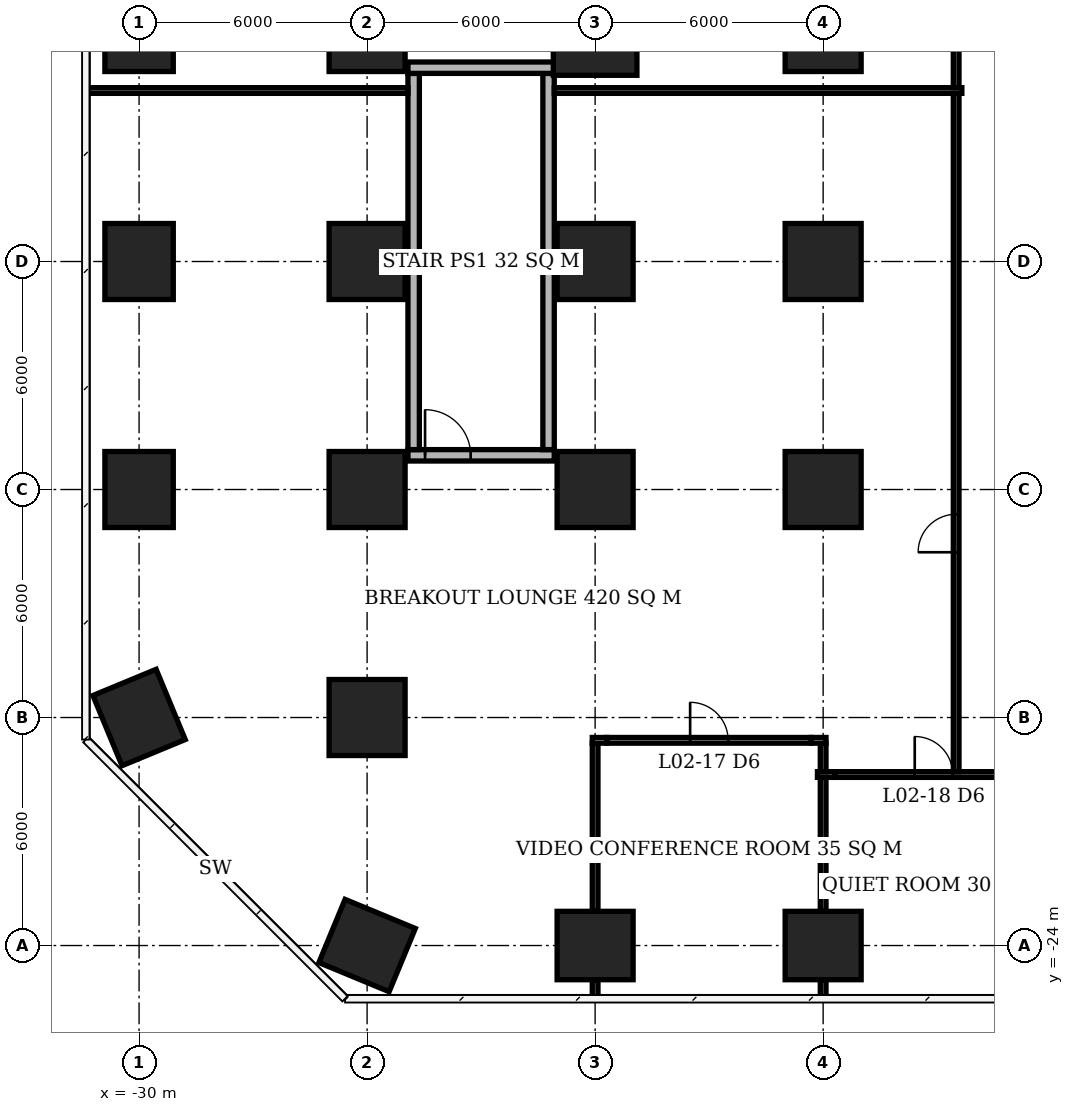
"""IFC4 building model, lengths in metres.
Left out: names, types, materials, properties, quantities, classifications, styles, units other than length and angle.
Written with IfcOpenShell. Run it as: python <this file> out.ifc"""

import sys

from ifc_helpers import new_model, si_unit, direction, frame, frame_2d, origin, origin_2d, place, context, subcontext, project, spatial, rectangle, extrude, element, fill, save


model = new_model("IFC4")
c1 = context("Model", 3, precision=1e-05, world=origin(), true_north=direction((0.0, 1.0)))
c2 = subcontext(c1, "Body", "Model", "MODEL_VIEW")
j1 = project(units=[si_unit("LENGTHUNIT", "METRE"), si_unit("PLANEANGLEUNIT", "RADIAN")], contexts=[c1])
p1 = place(None, origin())
s1 = spatial("IfcSite", under=j1, at=p1, CompositionType="ELEMENT")
p2 = place(p1, origin())
s2 = spatial("IfcBuilding", under=s1, at=p2, CompositionType="ELEMENT")
p3 = place(p2, frame((0.0, 0.0, 11.0)))
s3 = spatial("IfcBuildingStorey", under=s2, at=p3, CompositionType="ELEMENT", Elevation=11.0)
for number, where, z_axis, x_axis in (
    (1, (-30.0, -18.0, 0.0), (0.0, 0.0, 1.0), (-0.383, 0.924, 0.0)),
    (2, (-30.0, -12.0, 0.0), (0.0, 0.0, 1.0), (0.0, 1.0, 0.0)),
    (3, (-30.0, -6.0, 0.0), (0.0, 0.0, 1.0), (0.0, 1.0, 0.0)),
    (4, (-30.0, 0.0, 0.0), (0.0, 0.0, 1.0), (0.0, 1.0, 0.0)),
    (5, (-24.0, -24.0, 0.0), (0.0, 0.0, 1.0), (-0.924, 0.383, 0.0)),
):
    element("IfcColumn", number, at=place(p3, frame(where, z_axis=z_axis, x_axis=x_axis)), inside=s3, PredefinedType="COLUMN", context=c2, shape_type="SweptSolid", body=[
        extrude(rectangle(XDim=2.0, YDim=1.8, at=origin_2d()), origin(), (0.0, 0.0, 1.0), 7.2),
    ])
for number, where, z_axis, x_axis in (
    (6, (-24.0, -18.0, 0.0), (0.0, 0.0, 1.0), (1.0, 0.0, 0.0)),
    (7, (-24.0, -12.0, 0.0), (0.0, 0.0, 1.0), (1.0, 0.0, 0.0)),
    (8, (-24.0, -6.0, 0.0), (0.0, 0.0, 1.0), (1.0, 0.0, 0.0)),
    (9, (-24.0, 0.0, 0.0), (0.0, 0.0, 1.0), (1.0, 0.0, 0.0)),
):
    element("IfcColumn", number, at=place(p3, frame(where, z_axis=z_axis, x_axis=x_axis)), inside=s3, PredefinedType="COLUMN", context=c2, shape_type="SweptSolid", body=[
        extrude(rectangle(XDim=2.0, YDim=2.0, at=origin_2d()), origin(), (0.0, 0.0, 1.0), 7.2),
    ])
p4 = place(p3, frame((-18.0, -24.0, 0.0), z_axis=(0.0, 0.0, 1.0), x_axis=(1.0, 0.0, 0.0)))
e10 = element("IfcColumn", 10, at=p4, inside=s3, PredefinedType="COLUMN", context=c2, shape_type="SweptSolid", body=[
    extrude(rectangle(XDim=2.0, YDim=1.8, at=origin_2d()), origin(), (0.0, 0.0, 1.0), 7.2),
])
for number, where, z_axis, x_axis in (
    (11, (-18.0, -12.0, 0.0), (0.0, 0.0, 1.0), (1.0, 0.0, 0.0)),
    (12, (-18.0, -6.0, 0.0), (0.0, 0.0, 1.0), (1.0, 0.0, 0.0)),
):
    element("IfcColumn", number, at=place(p3, frame(where, z_axis=z_axis, x_axis=x_axis)), inside=s3, PredefinedType="COLUMN", context=c2, shape_type="SweptSolid", body=[
        extrude(rectangle(XDim=2.0, YDim=2.0, at=origin_2d()), origin(), (0.0, 0.0, 1.0), 7.2),
    ])
p5 = place(p3, frame((-18.0, 0.0, 0.0), z_axis=(0.0, 0.0, 1.0), x_axis=(1.0, 0.0, 0.0)))
e13 = element("IfcColumn", 13, at=p5, inside=s3, PredefinedType="COLUMN", context=c2, shape_type="SweptSolid", body=[
    extrude(rectangle(XDim=2.2, YDim=2.2, at=origin_2d()), origin(), (0.0, 0.0, 1.0), 7.2),
])
p6 = place(p3, frame((-12.0, -24.0, 0.0), z_axis=(0.0, 0.0, 1.0), x_axis=(1.0, 0.0, 0.0)))
e14 = element("IfcColumn", 14, at=p6, inside=s3, PredefinedType="COLUMN", context=c2, shape_type="SweptSolid", body=[
    extrude(rectangle(XDim=2.0, YDim=1.8, at=origin_2d()), origin(), (0.0, 0.0, 1.0), 7.2),
])
for number, where, z_axis, x_axis in (
    (15, (-12.0, -12.0, 0.0), (0.0, 0.0, 1.0), (1.0, 0.0, 0.0)),
    (16, (-12.0, -6.0, 0.0), (0.0, 0.0, 1.0), (1.0, 0.0, 0.0)),
    (17, (-12.0, 0.0, 0.0), (0.0, 0.0, 1.0), (1.0, 0.0, 0.0)),
):
    element("IfcColumn", number, at=place(p3, frame(where, z_axis=z_axis, x_axis=x_axis)), inside=s3, PredefinedType="COLUMN", context=c2, shape_type="SweptSolid", body=[
        extrude(rectangle(XDim=2.0, YDim=2.0, at=origin_2d()), origin(), (0.0, 0.0, 1.0), 7.2),
    ])
p7 = place(p3, frame((-22.925, -11.1, 0.0), z_axis=(0.0, 0.0, 1.0), x_axis=(1.0, 0.0, 0.0)))
e18 = element("IfcWall", 18, at=p7, inside=s3, PredefinedType="PARTITIONING", context=c2, shape_type="SweptSolid", body=[
    extrude(rectangle(XDim=3.85, YDim=0.3, at=frame_2d((1.925, 0.0))), origin(), (0.0, 0.0, 1.0), 6.95),
])
p8 = place(p7, frame((0.45, 0.0, 0.0)))
e19 = element("IfcOpeningElement", 19, at=p8, cuts=e18, PredefinedType="OPENING", context=c2, shape_type="SweptSolid", body=[
    extrude(rectangle(XDim=1.2, YDim=2.1, at=frame_2d((0.6, 1.05))), frame((0.0, 0.16, 0.0), z_axis=(0.0, -1.0, 0.0), x_axis=(1.0, 0.0, 0.0)), (0.0, 0.0, 1.0), 0.32),
])
p9 = place(p3, frame((-22.925, -0.9, 0.0), z_axis=(0.0, 0.0, 1.0), x_axis=(1.0, 0.0, 0.0)))
e20 = element("IfcWall", 20, at=p9, inside=s3, PredefinedType="PARTITIONING", context=c2, shape_type="SweptSolid", body=[
    extrude(rectangle(XDim=3.85, YDim=0.3, at=frame_2d((1.925, 0.0))), origin(), (0.0, 0.0, 1.0), 6.95),
])
for number, where, z_axis, x_axis in (
    (21, (-22.775, -10.95, 0.0), (0.0, 0.0, 1.0), (0.0, 1.0, 0.0)),
    (22, (-19.225, -10.95, 0.0), (0.0, 0.0, 1.0), (0.0, 1.0, 0.0)),
):
    element("IfcWall", number, at=place(p3, frame(where, z_axis=z_axis, x_axis=x_axis)), inside=s3, PredefinedType="PARTITIONING", context=c2, shape_type="SweptSolid", body=[
        extrude(rectangle(XDim=9.9, YDim=0.3, at=frame_2d((4.95, 0.0))), origin(), (0.0, 0.0, 1.0), 6.95),
    ])
p10 = place(p3, frame((-12.15, -19.5, 0.0), z_axis=(0.0, 0.0, 1.0), x_axis=(1.0, 0.0, 0.0)))
e23 = element("IfcWall", 23, at=p10, inside=s3, PredefinedType="PARTITIONING", context=c2, shape_type="SweptSolid", body=[
    extrude(rectangle(XDim=0.46, YDim=0.15, at=frame_2d((0.23, 0.0))), origin(), (0.0, 0.0, 1.0), 6.35),
])
p11 = place(p3, frame((-11.69, -19.5, 0.0), z_axis=(0.0, 0.0, 1.0), x_axis=(1.0, 0.0, 0.0)))
e24 = element("IfcWall", 24, at=p11, inside=s3, PredefinedType="PARTITIONING", context=c2, shape_type="SweptSolid", body=[
    extrude(rectangle(XDim=5.38, YDim=0.15, at=frame_2d((2.69, 0.0))), origin(), (0.0, 0.0, 1.0), 6.95),
])
p12 = place(p11, frame((2.1, 0.0, 0.0)))
e25 = element("IfcOpeningElement", 25, at=p12, cuts=e24, PredefinedType="OPENING", context=c2, shape_type="SweptSolid", body=[
    extrude(rectangle(XDim=1.0, YDim=2.1, at=frame_2d((0.5, 1.05))), frame((0.0, 0.085, 0.0), z_axis=(0.0, -1.0, 0.0), x_axis=(1.0, 0.0, 0.0)), (0.0, 0.0, 1.0), 0.17),
])
p13 = place(p3, frame((-18.075, -18.6, 0.0), z_axis=(0.0, 0.0, 1.0), x_axis=(1.0, 0.0, 0.0)))
e26 = element("IfcWall", 26, at=p13, inside=s3, PredefinedType="PARTITIONING", context=c2, shape_type="SweptSolid", body=[
    extrude(rectangle(XDim=0.385, YDim=0.15, at=frame_2d((0.192, 0.0))), origin(), (0.0, 0.0, 1.0), 6.35),
])
p14 = place(p3, frame((-17.69, -18.6, 0.0), z_axis=(0.0, 0.0, 1.0), x_axis=(1.0, 0.0, 0.0)))
e27 = element("IfcWall", 27, at=p14, inside=s3, PredefinedType="PARTITIONING", context=c2, shape_type="SweptSolid", body=[
    extrude(rectangle(XDim=5.38, YDim=0.15, at=frame_2d((2.69, 0.0))), origin(), (0.0, 0.0, 1.0), 6.95),
])
p15 = place(p14, frame((2.19, 0.0, 0.0)))
e28 = element("IfcOpeningElement", 28, at=p15, cuts=e27, PredefinedType="OPENING", context=c2, shape_type="SweptSolid", body=[
    extrude(rectangle(XDim=1.0, YDim=2.1, at=frame_2d((0.5, 1.05))), frame((0.0, 0.085, 0.0), z_axis=(0.0, -1.0, 0.0), x_axis=(1.0, 0.0, 0.0)), (0.0, 0.0, 1.0), 0.17),
])
p16 = place(p3, frame((-12.31, -18.6, 0.0), z_axis=(0.0, 0.0, 1.0), x_axis=(1.0, 0.0, 0.0)))
e29 = element("IfcWall", 29, at=p16, inside=s3, PredefinedType="PARTITIONING", context=c2, shape_type="SweptSolid", body=[
    extrude(rectangle(XDim=0.385, YDim=0.15, at=frame_2d((0.192, 0.0))), origin(), (0.0, 0.0, 1.0), 6.35),
])
p17 = place(p3, frame((-18.0, -25.375, 0.0), z_axis=(0.0, 0.0, 1.0), x_axis=(0.0, 1.0, 0.0)))
e30 = element("IfcWall", 30, at=p17, inside=s3, PredefinedType="PARTITIONING", context=c2, shape_type="SweptSolid", body=[
    extrude(rectangle(XDim=0.475, YDim=0.15, at=frame_2d((0.238, 0.0))), origin(), (0.0, 0.0, 1.0), 6.95),
])
p18 = place(p3, frame((-18.0, -23.1, 0.0), z_axis=(0.0, 0.0, 1.0), x_axis=(0.0, 1.0, 0.0)))
e31 = element("IfcWall", 31, at=p18, inside=s3, PredefinedType="PARTITIONING", context=c2, shape_type="SweptSolid", body=[
    extrude(rectangle(XDim=4.425, YDim=0.15, at=frame_2d((2.212, 0.0))), origin(), (0.0, 0.0, 1.0), 6.35),
])
p19 = place(p3, frame((-12.0, -25.375, 0.0), z_axis=(0.0, 0.0, 1.0), x_axis=(0.0, 1.0, 0.0)))
e32 = element("IfcWall", 32, at=p19, inside=s3, PredefinedType="PARTITIONING", context=c2, shape_type="SweptSolid", body=[
    extrude(rectangle(XDim=0.475, YDim=0.15, at=frame_2d((0.238, 0.0))), origin(), (0.0, 0.0, 1.0), 6.95),
])
p20 = place(p3, frame((-12.0, -23.1, 0.0), z_axis=(0.0, 0.0, 1.0), x_axis=(0.0, 1.0, 0.0)))
e33 = element("IfcWall", 33, at=p20, inside=s3, PredefinedType="PARTITIONING", context=c2, shape_type="SweptSolid", body=[
    extrude(rectangle(XDim=3.525, YDim=0.15, at=frame_2d((1.763, 0.0))), origin(), (0.0, 0.0, 1.0), 6.35),
])
p21 = place(p3, frame((-12.0, -19.425, 0.0), z_axis=(0.0, 0.0, 1.0), x_axis=(0.0, 1.0, 0.0)))
e34 = element("IfcWall", 34, at=p21, inside=s3, PredefinedType="PARTITIONING", context=c2, shape_type="SweptSolid", body=[
    extrude(rectangle(XDim=0.75, YDim=0.15, at=frame_2d((0.375, 0.0))), origin(), (0.0, 0.0, 1.0), 6.35),
])
p22 = place(p3, frame((-31.375, -1.5, 0.0), z_axis=(0.0, 0.0, 1.0), x_axis=(1.0, 0.0, 0.0)))
e35 = element("IfcWall", 35, at=p22, inside=s3, PredefinedType="PARTITIONING", context=c2, shape_type="SweptSolid", body=[
    extrude(rectangle(XDim=8.45, YDim=0.15, at=frame_2d((4.225, 0.0))), origin(), (0.0, 0.0, 1.0), 6.95),
])
p23 = place(p3, frame((-19.075, -1.5, 0.0), z_axis=(0.0, 0.0, 1.0), x_axis=(1.0, 0.0, 0.0)))
e36 = element("IfcWall", 36, at=p23, inside=s3, PredefinedType="PARTITIONING", context=c2, shape_type="SweptSolid", body=[
    extrude(rectangle(XDim=10.725, YDim=0.15, at=frame_2d((5.362, 0.0))), origin(), (0.0, 0.0, 1.0), 6.95),
])
p24 = place(p3, frame((-8.5, -19.425, 0.0), z_axis=(0.0, 0.0, 1.0), x_axis=(0.0, 1.0, 0.0)))
e37 = element("IfcWall", 37, at=p24, inside=s3, PredefinedType="PARTITIONING", context=c2, shape_type="SweptSolid", body=[
    extrude(rectangle(XDim=17.85, YDim=0.15, at=frame_2d((8.925, 0.0))), origin(), (0.0, 0.0, 1.0), 6.95),
])
p25 = place(p24, frame((5.774, 0.0, 0.0)))
e38 = element("IfcOpeningElement", 38, at=p25, cuts=e37, PredefinedType="OPENING", context=c2, shape_type="SweptSolid", body=[
    extrude(rectangle(XDim=1.0, YDim=2.1, at=frame_2d((0.5, 1.05))), frame((0.0, 0.085, 0.0), z_axis=(0.0, -1.0, 0.0), x_axis=(1.0, 0.0, 0.0)), (0.0, 0.0, 1.0), 0.17),
])
p26 = place(p3, frame((-8.5, -1.425, 0.0), z_axis=(0.0, 0.0, 1.0), x_axis=(0.0, 1.0, 0.0)))
e39 = element("IfcWall", 39, at=p26, inside=s3, PredefinedType="PARTITIONING", context=c2, shape_type="SweptSolid", body=[
    extrude(rectangle(XDim=8.85, YDim=0.15, at=frame_2d((4.425, 0.0))), origin(), (0.0, 0.0, 1.0), 6.95),
])
p27 = place(p26, frame((2.575, 0.0, 0.0)))
e40 = element("IfcOpeningElement", 40, at=p27, cuts=e39, PredefinedType="OPENING", context=c2, shape_type="SweptSolid", body=[
    extrude(rectangle(XDim=1.0, YDim=2.1, at=frame_2d((0.5, 1.05))), frame((0.0, 0.085, 0.0), z_axis=(0.0, -1.0, 0.0), x_axis=(1.0, 0.0, 0.0)), (0.0, 0.0, 1.0), 0.17),
])
p28 = place(p8, origin())
e41 = element("IfcDoor", 41, at=p28, inside=s3, OperationType="SINGLE_SWING_LEFT", PredefinedType="DOOR", context=c2, shape_type="SweptSolid", body=[
    extrude(rectangle(XDim=1.2, YDim=2.1, at=frame_2d((0.6, 1.05))), frame((0.0, 0.025, 0.0), z_axis=(0.0, -1.0, 0.0), x_axis=(1.0, 0.0, 0.0)), (0.0, 0.0, 1.0), 0.05),
])
fill(e19, e41)
p29 = place(p15, origin())
e42 = element("IfcDoor", 42, at=p29, inside=s3, OperationType="SINGLE_SWING_LEFT", PredefinedType="DOOR", context=c2, shape_type="SweptSolid", body=[
    extrude(rectangle(XDim=1.0, YDim=2.1, at=frame_2d((0.5, 1.05))), frame((0.0, 0.025, 0.0), z_axis=(0.0, -1.0, 0.0), x_axis=(1.0, 0.0, 0.0)), (0.0, 0.0, 1.0), 0.05),
])
fill(e28, e42)
p30 = place(p12, origin())
e43 = element("IfcDoor", 43, at=p30, inside=s3, OperationType="SINGLE_SWING_LEFT", PredefinedType="DOOR", context=c2, shape_type="SweptSolid", body=[
    extrude(rectangle(XDim=1.0, YDim=2.1, at=frame_2d((0.5, 1.05))), frame((0.0, 0.025, 0.0), z_axis=(0.0, -1.0, 0.0), x_axis=(1.0, 0.0, 0.0)), (0.0, 0.0, 1.0), 0.05),
])
fill(e25, e43)
p31 = place(p25, origin())
e44 = element("IfcDoor", 44, at=p31, inside=s3, OperationType="SINGLE_SWING_LEFT", PredefinedType="DOOR", context=c2, shape_type="SweptSolid", body=[
    extrude(rectangle(XDim=1.0, YDim=2.1, at=frame_2d((0.5, 1.05))), frame((0.0, 0.025, 0.0), z_axis=(0.0, -1.0, 0.0), x_axis=(1.0, 0.0, 0.0)), (0.0, 0.0, 1.0), 0.05),
])
fill(e38, e44)
save(model, sys.argv[1])
